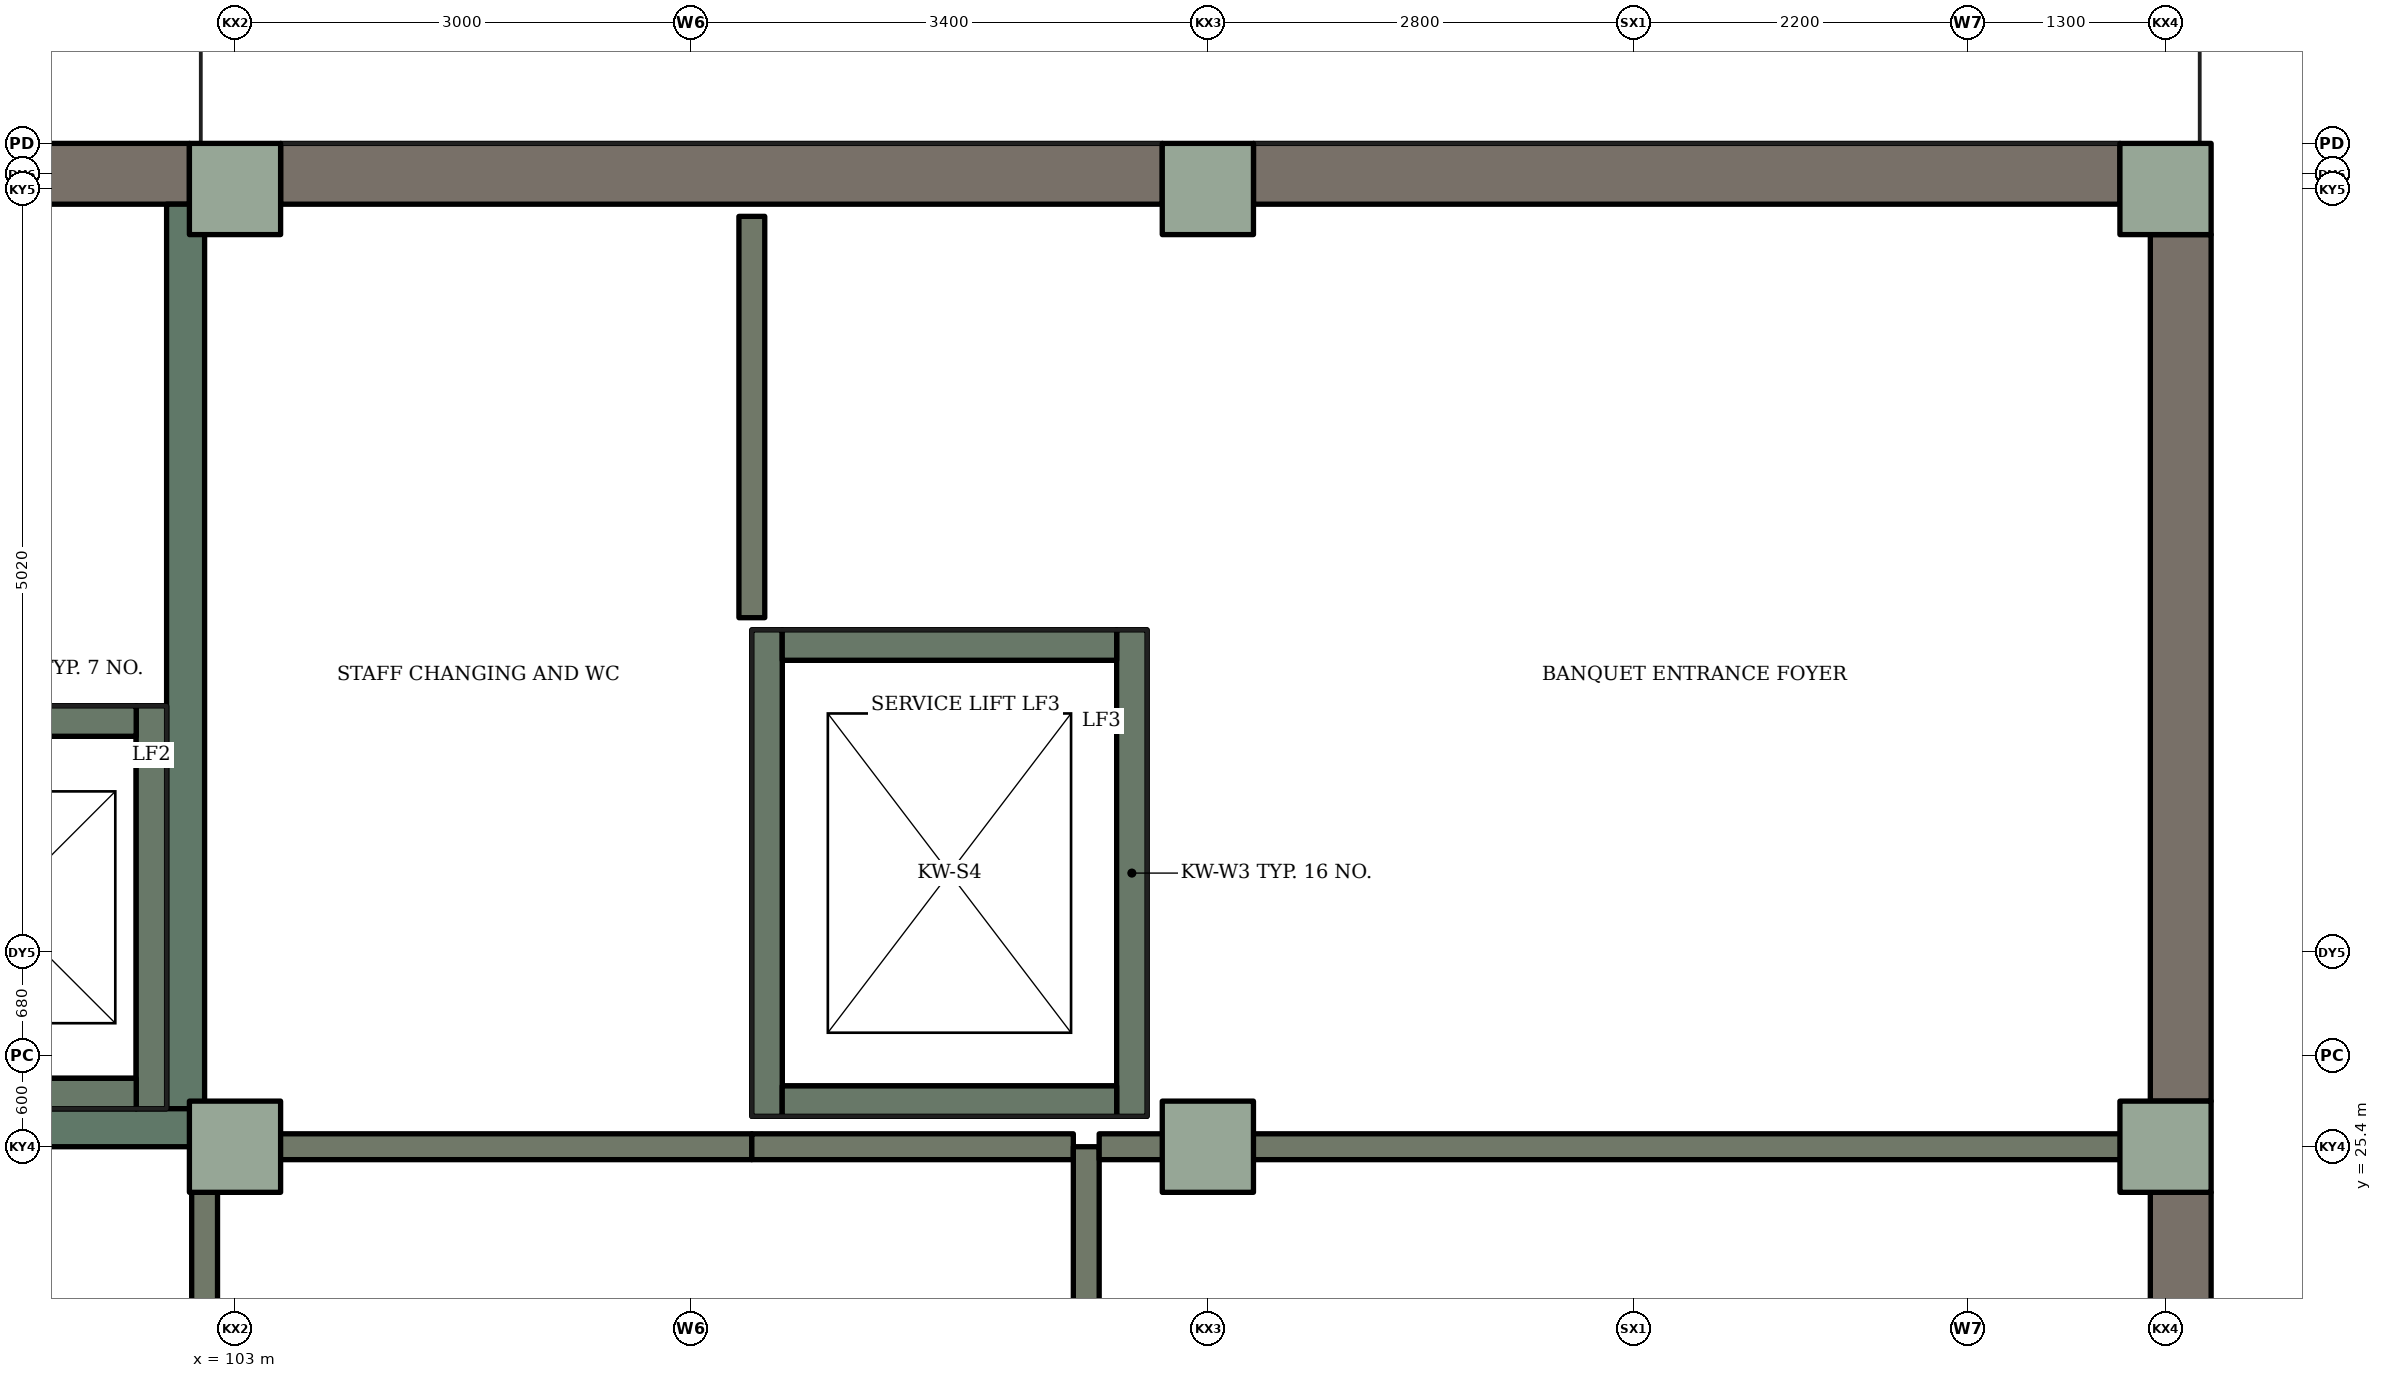
"""IFC4 building model, lengths in metres.
Left out: names, types, materials, properties, quantities, classifications, styles, units other than length and angle.
Written with IfcOpenShell. Run it as: python <this file> out.ifc"""

import sys

from ifc_helpers import new_model, si_unit, direction, frame, frame_2d, origin, origin_2d, place, context, subcontext, project, spatial, rectangle, extrude, element, fill, save


model = new_model("IFC4")
c1 = context("Model", 3, precision=1e-05, world=origin(), true_north=direction((0.0, 1.0)))
c2 = subcontext(c1, "Body", "Model", "MODEL_VIEW")
j1 = project(units=[si_unit("LENGTHUNIT", "METRE"), si_unit("PLANEANGLEUNIT", "RADIAN")], contexts=[c1])
p1 = place(None, origin())
s1 = spatial("IfcSite", under=j1, at=p1, CompositionType="ELEMENT")
p2 = place(p1, origin())
s2 = spatial("IfcBuilding", under=s1, at=p2, CompositionType="ELEMENT")
p3 = place(p2, origin())
s3 = spatial("IfcBuildingStorey", under=s2, at=p3, CompositionType="ELEMENT", Elevation=0.0)
for number, where, z_axis, x_axis in (
    (1, (103.0, 25.4, 0.0), (0.0, 0.0, 1.0), (1.0, 0.0, 0.0)),
    (2, (103.0, 31.7, 0.0), (0.0, 0.0, 1.0), (1.0, 0.0, 0.0)),
    (3, (109.4, 25.4, 0.0), (0.0, 0.0, 1.0), (1.0, 0.0, 0.0)),
    (4, (109.4, 31.7, 0.0), (0.0, 0.0, 1.0), (1.0, 0.0, 0.0)),
    (5, (115.7, 25.4, 0.0), (0.0, 0.0, 1.0), (1.0, 0.0, 0.0)),
    (6, (115.7, 31.7, 0.0), (0.0, 0.0, 1.0), (1.0, 0.0, 0.0)),
):
    element("IfcColumn", number, at=place(p3, frame(where, z_axis=z_axis, x_axis=x_axis)), inside=s3, PredefinedType="COLUMN", context=c2, shape_type="SweptSolid", body=[
        extrude(rectangle(XDim=0.6, YDim=0.6, at=origin_2d()), origin(), (0.0, 0.0, 1.0), 4.2),
    ])
p4 = place(p3, frame((97.0, 31.8, 0.0), z_axis=(0.0, 0.0, 1.0), x_axis=(1.0, 0.0, 0.0)))
e7 = element("IfcWall", 7, at=p4, inside=s3, PredefinedType="SOLIDWALL", context=c2, shape_type="SweptSolid", body=[
    extrude(rectangle(XDim=5.7, YDim=0.4, at=frame_2d((2.85, 0.0))), origin(), (0.0, 0.0, 1.0), 4.2),
])
p5 = place(p4, frame((1.5, 0.0, 0.0)))
e8 = element("IfcOpeningElement", 8, at=p5, cuts=e7, PredefinedType="OPENING", context=c2, shape_type="SweptSolid", body=[
    extrude(rectangle(XDim=1.0, YDim=2.4, at=frame_2d((0.5, 1.2))), frame((0.0, 0.21, 0.0), z_axis=(0.0, -1.0, 0.0), x_axis=(1.0, 0.0, 0.0)), (0.0, 0.0, 1.0), 0.42),
])
p6 = place(p3, frame((103.3, 31.8, 0.0), z_axis=(0.0, 0.0, 1.0), x_axis=(1.0, 0.0, 0.0)))
e9 = element("IfcWall", 9, at=p6, inside=s3, PredefinedType="SOLIDWALL", context=c2, shape_type="SweptSolid", body=[
    extrude(rectangle(XDim=5.8, YDim=0.4, at=frame_2d((2.9, 0.0))), origin(), (0.0, 0.0, 1.0), 4.2),
])
p7 = place(p6, frame((0.925, 0.0, 1.5)))
e10 = element("IfcOpeningElement", 10, at=p7, cuts=e9, PredefinedType="OPENING", context=c2, shape_type="SweptSolid", body=[
    extrude(rectangle(XDim=0.75, YDim=1.2, at=frame_2d((0.375, 0.6))), frame((0.0, 0.21, 0.0), z_axis=(0.0, -1.0, 0.0), x_axis=(1.0, 0.0, 0.0)), (0.0, 0.0, 1.0), 0.42),
])
p8 = place(p3, frame((109.7, 31.8, 0.0), z_axis=(0.0, 0.0, 1.0), x_axis=(1.0, 0.0, 0.0)))
e11 = element("IfcWall", 11, at=p8, inside=s3, PredefinedType="SOLIDWALL", context=c2, shape_type="SweptSolid", body=[
    extrude(rectangle(XDim=5.7, YDim=0.4, at=frame_2d((2.85, 0.0))), origin(), (0.0, 0.0, 1.0), 4.2),
])
p9 = place(p8, frame((1.95, 0.0, 0.0)))
e12 = element("IfcOpeningElement", 12, at=p9, cuts=e11, PredefinedType="OPENING", context=c2, shape_type="SweptSolid", body=[
    extrude(rectangle(XDim=1.8, YDim=2.4, at=frame_2d((0.9, 1.2))), frame((0.0, 0.21, 0.0), z_axis=(0.0, -1.0, 0.0), x_axis=(1.0, 0.0, 0.0)), (0.0, 0.0, 1.0), 0.42),
])
p10 = place(p3, frame((115.8, 25.1, 0.0), z_axis=(0.0, 0.0, 1.0), x_axis=(0.0, -1.0, 0.0)))
e13 = element("IfcWall", 13, at=p10, inside=s3, PredefinedType="SOLIDWALL", context=c2, shape_type="SweptSolid", body=[
    extrude(rectangle(XDim=5.8, YDim=0.4, at=frame_2d((2.9, 0.0))), origin(), (0.0, 0.0, 1.0), 4.2),
])
p11 = place(p10, frame((1.7, 0.0, 1.5)))
e14 = element("IfcOpeningElement", 14, at=p11, cuts=e13, PredefinedType="OPENING", context=c2, shape_type="SweptSolid", body=[
    extrude(rectangle(XDim=2.4, YDim=1.2, at=frame_2d((1.2, 0.6))), frame((0.0, 0.21, 0.0), z_axis=(0.0, -1.0, 0.0), x_axis=(1.0, 0.0, 0.0)), (0.0, 0.0, 1.0), 0.42),
])
p12 = place(p3, frame((115.8, 31.4, 0.0), z_axis=(0.0, 0.0, 1.0), x_axis=(0.0, -1.0, 0.0)))
e15 = element("IfcWall", 15, at=p12, inside=s3, PredefinedType="SOLIDWALL", context=c2, shape_type="SweptSolid", body=[
    extrude(rectangle(XDim=5.7, YDim=0.4, at=frame_2d((2.85, 0.0))), origin(), (0.0, 0.0, 1.0), 4.2),
])
p13 = place(p12, frame((1.65, 0.0, 1.0)))
e16 = element("IfcOpeningElement", 16, at=p13, cuts=e15, PredefinedType="OPENING", context=c2, shape_type="SweptSolid", body=[
    extrude(rectangle(XDim=2.4, YDim=1.8, at=frame_2d((1.2, 0.9))), frame((0.0, 0.21, 0.0), z_axis=(0.0, -1.0, 0.0), x_axis=(1.0, 0.0, 0.0)), (0.0, 0.0, 1.0), 0.42),
])
p14 = place(p3, frame((102.675, 25.65, 0.0), z_axis=(0.0, 0.0, 1.0), x_axis=(0.0, 1.0, 0.0)))
e17 = element("IfcWall", 17, at=p14, inside=s3, PredefinedType="SHEAR", context=c2, shape_type="SweptSolid", body=[
    extrude(rectangle(XDim=5.95, YDim=0.25, at=frame_2d((2.975, 0.0))), origin(), (0.0, 0.0, 1.0), 4.2),
])
p15 = place(p14, frame((4.0, 0.0, 0.0)))
e18 = element("IfcOpeningElement", 18, at=p15, cuts=e17, PredefinedType="OPENING", context=c2, shape_type="SweptSolid", body=[
    extrude(rectangle(XDim=1.0, YDim=2.1, at=frame_2d((0.5, 1.05))), frame((0.0, 0.135, 0.0), z_axis=(0.0, -1.0, 0.0), x_axis=(1.0, 0.0, 0.0)), (0.0, 0.0, 1.0), 0.27),
])
p16 = place(p3, frame((96.8, 25.525, 0.0), z_axis=(0.0, 0.0, 1.0), x_axis=(1.0, 0.0, 0.0)))
e19 = element("IfcWall", 19, at=p16, inside=s3, PredefinedType="SHEAR", context=c2, shape_type="SweptSolid", body=[
    extrude(rectangle(XDim=6.0, YDim=0.25, at=frame_2d((3.0, 0.0))), origin(), (0.0, 0.0, 1.0), 4.2),
])
p17 = place(p3, frame((102.45, 25.65, 0.0), z_axis=(0.0, 0.0, 1.0), x_axis=(0.0, 1.0, 0.0)))
e20 = element("IfcWall", 20, at=p17, inside=s3, PredefinedType="SHEAR", context=c2, shape_type="SweptSolid", body=[
    extrude(rectangle(XDim=2.65, YDim=0.2, at=frame_2d((1.325, 0.0))), origin(), (0.0, 0.0, 1.0), 4.2),
])
p18 = place(p3, frame((100.55, 25.75, 0.0), z_axis=(0.0, 0.0, 1.0), x_axis=(1.0, 0.0, 0.0)))
e21 = element("IfcWall", 21, at=p18, inside=s3, PredefinedType="SHEAR", context=c2, shape_type="SweptSolid", body=[
    extrude(rectangle(XDim=1.8, YDim=0.2, at=frame_2d((0.9, 0.0))), origin(), (0.0, 0.0, 1.0), 4.2),
])
p19 = place(p3, frame((100.55, 28.2, 0.0), z_axis=(0.0, 0.0, 1.0), x_axis=(1.0, 0.0, 0.0)))
e22 = element("IfcWall", 22, at=p19, inside=s3, PredefinedType="SHEAR", context=c2, shape_type="SweptSolid", body=[
    extrude(rectangle(XDim=1.8, YDim=0.2, at=frame_2d((0.9, 0.0))), origin(), (0.0, 0.0, 1.0), 4.2),
])
p20 = place(p19, frame((0.35, 0.0, 0.0)))
e23 = element("IfcOpeningElement", 23, at=p20, cuts=e22, PredefinedType="OPENING", context=c2, shape_type="SweptSolid", body=[
    extrude(rectangle(XDim=1.1, YDim=2.1, at=frame_2d((0.55, 1.05))), frame((0.0, 0.11, 0.0), z_axis=(0.0, -1.0, 0.0), x_axis=(1.0, 0.0, 0.0)), (0.0, 0.0, 1.0), 0.22),
])
for number, where, z_axis, x_axis in (
    (24, (106.5, 25.6, 0.0), (0.0, 0.0, 1.0), (0.0, 1.0, 0.0)),
    (25, (108.9, 25.6, 0.0), (0.0, 0.0, 1.0), (0.0, 1.0, 0.0)),
):
    element("IfcWall", number, at=place(p3, frame(where, z_axis=z_axis, x_axis=x_axis)), inside=s3, PredefinedType="SHEAR", context=c2, shape_type="SweptSolid", body=[
        extrude(rectangle(XDim=3.2, YDim=0.2, at=frame_2d((1.6, 0.0))), origin(), (0.0, 0.0, 1.0), 4.2),
    ])
p21 = place(p3, frame((106.6, 25.7, 0.0), z_axis=(0.0, 0.0, 1.0), x_axis=(1.0, 0.0, 0.0)))
e26 = element("IfcWall", 26, at=p21, inside=s3, PredefinedType="SHEAR", context=c2, shape_type="SweptSolid", body=[
    extrude(rectangle(XDim=2.2, YDim=0.2, at=frame_2d((1.1, 0.0))), origin(), (0.0, 0.0, 1.0), 4.2),
])
p22 = place(p3, frame((106.6, 28.7, 0.0), z_axis=(0.0, 0.0, 1.0), x_axis=(1.0, 0.0, 0.0)))
e27 = element("IfcWall", 27, at=p22, inside=s3, PredefinedType="SHEAR", context=c2, shape_type="SweptSolid", body=[
    extrude(rectangle(XDim=2.2, YDim=0.2, at=frame_2d((1.1, 0.0))), origin(), (0.0, 0.0, 1.0), 4.2),
])
p23 = place(p22, frame((0.55, 0.0, 0.0)))
e28 = element("IfcOpeningElement", 28, at=p23, cuts=e27, PredefinedType="OPENING", context=c2, shape_type="SweptSolid", body=[
    extrude(rectangle(XDim=1.1, YDim=2.1, at=frame_2d((0.55, 1.05))), frame((0.0, 0.11, 0.0), z_axis=(0.0, -1.0, 0.0), x_axis=(1.0, 0.0, 0.0)), (0.0, 0.0, 1.0), 0.22),
])
p24 = place(p3, frame((102.45, 25.65, -1.4), z_axis=(0.0, 0.0, 1.0), x_axis=(0.0, 1.0, 0.0)))
e29 = element("IfcWall", 29, at=p24, inside=s3, PredefinedType="SHEAR", context=c2, shape_type="SweptSolid", body=[
    extrude(rectangle(XDim=2.65, YDim=0.2, at=frame_2d((1.325, 0.0))), origin(), (0.0, 0.0, 1.0), 1.4),
])
for number, where, z_axis, x_axis in (
    (30, (100.55, 25.75, -1.4), (0.0, 0.0, 1.0), (1.0, 0.0, 0.0)),
    (31, (100.55, 28.2, -1.4), (0.0, 0.0, 1.0), (1.0, 0.0, 0.0)),
):
    element("IfcWall", number, at=place(p3, frame(where, z_axis=z_axis, x_axis=x_axis)), inside=s3, PredefinedType="SHEAR", context=c2, shape_type="SweptSolid", body=[
        extrude(rectangle(XDim=1.8, YDim=0.2, at=frame_2d((0.9, 0.0))), origin(), (0.0, 0.0, 1.0), 1.4),
    ])
for number, where, z_axis, x_axis in (
    (32, (106.5, 25.6, -1.4), (0.0, 0.0, 1.0), (0.0, 1.0, 0.0)),
    (33, (108.9, 25.6, -1.4), (0.0, 0.0, 1.0), (0.0, 1.0, 0.0)),
):
    element("IfcWall", number, at=place(p3, frame(where, z_axis=z_axis, x_axis=x_axis)), inside=s3, PredefinedType="SHEAR", context=c2, shape_type="SweptSolid", body=[
        extrude(rectangle(XDim=3.2, YDim=0.2, at=frame_2d((1.6, 0.0))), origin(), (0.0, 0.0, 1.0), 1.4),
    ])
for number, where, z_axis, x_axis in (
    (34, (106.6, 25.7, -1.4), (0.0, 0.0, 1.0), (1.0, 0.0, 0.0)),
    (35, (106.6, 28.7, -1.4), (0.0, 0.0, 1.0), (1.0, 0.0, 0.0)),
):
    element("IfcWall", number, at=place(p3, frame(where, z_axis=z_axis, x_axis=x_axis)), inside=s3, PredefinedType="SHEAR", context=c2, shape_type="SweptSolid", body=[
        extrude(rectangle(XDim=2.2, YDim=0.2, at=frame_2d((1.1, 0.0))), origin(), (0.0, 0.0, 1.0), 1.4),
    ])
p25 = place(p3, frame((102.8, 21.4, 0.0), z_axis=(0.0, 0.0, 1.0), x_axis=(0.0, 1.0, 0.0)))
e36 = element("IfcWall", 36, at=p25, inside=s3, PredefinedType="PARTITIONING", context=c2, shape_type="SweptSolid", body=[
    extrude(rectangle(XDim=3.92, YDim=0.17, at=frame_2d((1.96, 0.0))), origin(), (0.0, 0.0, 1.0), 3.92),
])
p26 = place(p3, frame((103.22, 31.6, 0.0), z_axis=(0.0, 0.0, 1.0), x_axis=(-1.0, 0.0, 0.0)))
e37 = element("IfcWall", 37, at=p26, inside=s3, PredefinedType="PARTITIONING", context=c2, shape_type="SweptSolid", body=[
    extrude(rectangle(XDim=0.34, YDim=0.17, at=frame_2d((0.17, 0.0))), origin(), (0.0, 0.0, 1.0), 3.92),
])
p27 = place(p3, frame((106.4, 25.4, 0.0), z_axis=(0.0, 0.0, 1.0), x_axis=(-1.0, 0.0, 0.0)))
e38 = element("IfcWall", 38, at=p27, inside=s3, PredefinedType="PARTITIONING", context=c2, shape_type="SweptSolid", body=[
    extrude(rectangle(XDim=3.52, YDim=0.17, at=frame_2d((1.76, 0.0))), origin(), (0.0, 0.0, 1.0), 3.92),
])
p28 = place(p27, frame((1.15, 0.0, 0.0)))
e39 = element("IfcOpeningElement", 39, at=p28, cuts=e38, PredefinedType="OPENING", context=c2, shape_type="SweptSolid", body=[
    extrude(rectangle(XDim=1.2, YDim=2.1, at=frame_2d((0.6, 1.05))), frame((0.0, 0.095, 0.0), z_axis=(0.0, -1.0, 0.0), x_axis=(1.0, 0.0, 0.0)), (0.0, 0.0, 1.0), 0.19),
])
p29 = place(p3, frame((106.4, 28.88, 0.0), z_axis=(0.0, 0.0, 1.0), x_axis=(0.0, 1.0, 0.0)))
e40 = element("IfcWall", 40, at=p29, inside=s3, PredefinedType="PARTITIONING", context=c2, shape_type="SweptSolid", body=[
    extrude(rectangle(XDim=2.64, YDim=0.17, at=frame_2d((1.32, 0.0))), origin(), (0.0, 0.0, 1.0), 3.92),
])
p30 = place(p3, frame((108.515, 25.4, 0.0), z_axis=(0.0, 0.0, 1.0), x_axis=(-1.0, 0.0, 0.0)))
e41 = element("IfcWall", 41, at=p30, inside=s3, PredefinedType="PARTITIONING", context=c2, shape_type="SweptSolid", body=[
    extrude(rectangle(XDim=2.115, YDim=0.17, at=frame_2d((1.058, 0.0))), origin(), (0.0, 0.0, 1.0), 3.92),
])
p31 = place(p3, frame((108.6, 21.485, 0.0), z_axis=(0.0, 0.0, 1.0), x_axis=(0.0, 1.0, 0.0)))
e42 = element("IfcWall", 42, at=p31, inside=s3, PredefinedType="PARTITIONING", context=c2, shape_type="SweptSolid", body=[
    extrude(rectangle(XDim=3.915, YDim=0.17, at=frame_2d((1.958, 0.0))), origin(), (0.0, 0.0, 1.0), 3.92),
])
p32 = place(p3, frame((109.58, 25.4, 0.0), z_axis=(0.0, 0.0, 1.0), x_axis=(-1.0, 0.0, 0.0)))
e43 = element("IfcWall", 43, at=p32, inside=s3, PredefinedType="PARTITIONING", context=c2, shape_type="SweptSolid", body=[
    extrude(rectangle(XDim=0.895, YDim=0.17, at=frame_2d((0.448, 0.0))), origin(), (0.0, 0.0, 1.0), 3.92),
])
p33 = place(p3, frame((109.58, 31.6, 0.0), z_axis=(0.0, 0.0, 1.0), x_axis=(-1.0, 0.0, 0.0)))
e44 = element("IfcWall", 44, at=p33, inside=s3, PredefinedType="PARTITIONING", context=c2, shape_type="SweptSolid", body=[
    extrude(rectangle(XDim=0.4, YDim=0.17, at=frame_2d((0.2, 0.0))), origin(), (0.0, 0.0, 1.0), 3.92),
])
p34 = place(p3, frame((115.6, 25.4, 0.0), z_axis=(0.0, 0.0, 1.0), x_axis=(-1.0, 0.0, 0.0)))
e45 = element("IfcWall", 45, at=p34, inside=s3, PredefinedType="PARTITIONING", context=c2, shape_type="SweptSolid", body=[
    extrude(rectangle(XDim=5.98, YDim=0.17, at=frame_2d((2.99, 0.0))), origin(), (0.0, 0.0, 1.0), 3.92),
])
p35 = place(p34, frame((2.45, 0.0, 0.0)))
e46 = element("IfcOpeningElement", 46, at=p35, cuts=e45, PredefinedType="OPENING", context=c2, shape_type="SweptSolid", body=[
    extrude(rectangle(XDim=1.0, YDim=2.1, at=frame_2d((0.5, 1.05))), frame((0.0, 0.095, 0.0), z_axis=(0.0, -1.0, 0.0), x_axis=(1.0, 0.0, 0.0)), (0.0, 0.0, 1.0), 0.19),
])
p36 = place(p9, origin())
e47 = element("IfcDoor", 47, at=p36, inside=s3, OperationType="DOUBLE_DOOR_SINGLE_SWING", PredefinedType="DOOR", context=c2, shape_type="SweptSolid", body=[
    extrude(rectangle(XDim=1.8, YDim=2.4, at=frame_2d((0.9, 1.2))), frame((0.0, 0.025, 0.0), z_axis=(0.0, -1.0, 0.0), x_axis=(1.0, 0.0, 0.0)), (0.0, 0.0, 1.0), 0.05),
])
fill(e12, e47)
p37 = place(p13, origin())
e48 = element("IfcWindow", 48, at=p37, inside=s3, PartitioningType="SINGLE_PANEL", PredefinedType="WINDOW", context=c2, shape_type="SweptSolid", body=[
    extrude(rectangle(XDim=2.4, YDim=1.8, at=frame_2d((1.2, 0.9))), frame((0.0, 0.03, 0.0), z_axis=(0.0, -1.0, 0.0), x_axis=(1.0, 0.0, 0.0)), (0.0, 0.0, 1.0), 0.06),
])
fill(e16, e48)
p38 = place(p7, origin())
e49 = element("IfcWindow", 49, at=p38, inside=s3, PartitioningType="SINGLE_PANEL", PredefinedType="WINDOW", context=c2, shape_type="SweptSolid", body=[
    extrude(rectangle(XDim=0.75, YDim=1.2, at=frame_2d((0.375, 0.6))), frame((0.0, 0.03, 0.0), z_axis=(0.0, -1.0, 0.0), x_axis=(1.0, 0.0, 0.0)), (0.0, 0.0, 1.0), 0.06),
])
fill(e10, e49)
p39 = place(p20, origin())
e50 = element("IfcDoor", 50, at=p39, inside=s3, OperationType="SLIDING_TO_LEFT", PredefinedType="DOOR", context=c2, shape_type="SweptSolid", body=[
    extrude(rectangle(XDim=1.1, YDim=2.1, at=frame_2d((0.55, 1.05))), frame((0.0, 0.025, 0.0), z_axis=(0.0, -1.0, 0.0), x_axis=(1.0, 0.0, 0.0)), (0.0, 0.0, 1.0), 0.05),
])
fill(e23, e50)
p40 = place(p23, origin())
e51 = element("IfcDoor", 51, at=p40, inside=s3, OperationType="SLIDING_TO_LEFT", PredefinedType="DOOR", context=c2, shape_type="SweptSolid", body=[
    extrude(rectangle(XDim=1.1, YDim=2.1, at=frame_2d((0.55, 1.05))), frame((0.0, 0.025, 0.0), z_axis=(0.0, -1.0, 0.0), x_axis=(1.0, 0.0, 0.0)), (0.0, 0.0, 1.0), 0.05),
])
fill(e28, e51)
p41 = place(p35, origin())
e52 = element("IfcDoor", 52, at=p41, inside=s3, OperationType="SINGLE_SWING_LEFT", PredefinedType="DOOR", context=c2, shape_type="SweptSolid", body=[
    extrude(rectangle(XDim=1.0, YDim=2.1, at=frame_2d((0.5, 1.05))), frame((0.0, 0.025, 0.0), z_axis=(0.0, -1.0, 0.0), x_axis=(1.0, 0.0, 0.0)), (0.0, 0.0, 1.0), 0.05),
])
fill(e46, e52)
p42 = place(p15, origin())
e53 = element("IfcDoor", 53, at=p42, inside=s3, OperationType="SINGLE_SWING_LEFT", PredefinedType="DOOR", context=c2, shape_type="SweptSolid", body=[
    extrude(rectangle(XDim=1.0, YDim=2.1, at=frame_2d((0.5, 1.05))), frame((0.0, 0.025, 0.0), z_axis=(0.0, -1.0, 0.0), x_axis=(1.0, 0.0, 0.0)), (0.0, 0.0, 1.0), 0.05),
])
fill(e18, e53)
p43 = place(p28, origin())
e54 = element("IfcDoor", 54, at=p43, inside=s3, OperationType="SINGLE_SWING_LEFT", PredefinedType="DOOR", context=c2, shape_type="SweptSolid", body=[
    extrude(rectangle(XDim=1.2, YDim=2.1, at=frame_2d((0.6, 1.05))), frame((0.0, 0.025, 0.0), z_axis=(0.0, -1.0, 0.0), x_axis=(1.0, 0.0, 0.0)), (0.0, 0.0, 1.0), 0.05),
])
fill(e39, e54)
save(model, sys.argv[1])
